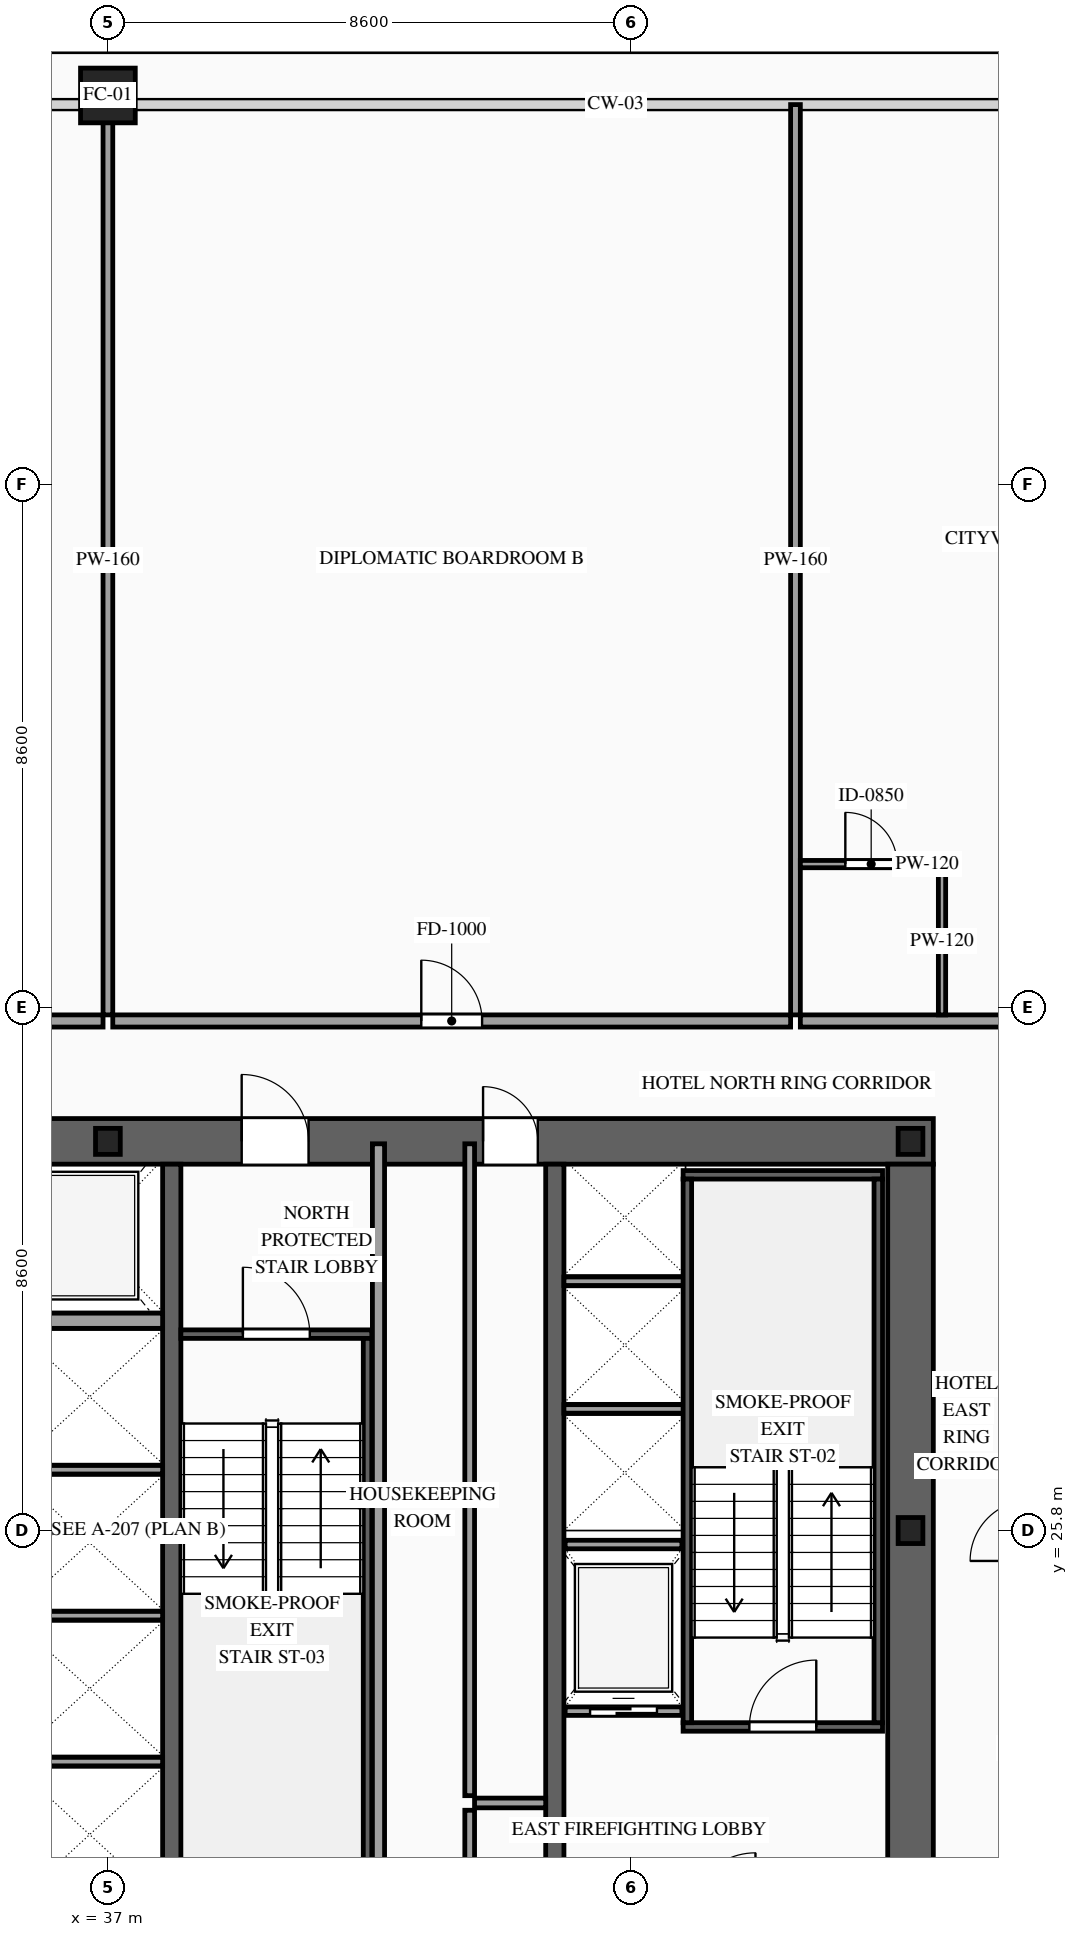
"""IFC4 building model, lengths in metres.
Left out: names, types, materials, properties, quantities, classifications, styles, units other than length and angle.
Written with IfcOpenShell. Run it as: python <this file> out.ifc"""

import sys

from ifc_helpers import new_model, si_unit, direction, frame, frame_2d, origin, origin_2d, place, context, subcontext, project, spatial, rectangle, hollow_rectangle, i_section, extrude, source, transform, mapped, element, fill, save


model = new_model("IFC4")
c1 = context("Model", 3, precision=1e-05, world=origin(), true_north=direction((0.0, 1.0)))
c2 = subcontext(c1, "Body", "Model", "MODEL_VIEW")
j1 = project(units=[si_unit("LENGTHUNIT", "METRE"), si_unit("PLANEANGLEUNIT", "RADIAN")], contexts=[c1])
p1 = place(None, origin())
s1 = spatial("IfcSite", under=j1, at=p1, CompositionType="ELEMENT")
p2 = place(p1, origin())
s2 = spatial("IfcBuilding", under=s1, at=p2, CompositionType="ELEMENT")
p3 = place(p2, frame((0.0, 0.0, 101.0)))
s3 = spatial("IfcBuildingStorey", under=s2, at=p3, CompositionType="ELEMENT", Elevation=101.0)
p4 = place(p3, frame((23.425, 32.2, 0.0), z_axis=(0.0, 0.0, 1.0), x_axis=(1.0, 0.0, 0.0)))
e1 = element("IfcWall", 1, at=p4, inside=s3, PredefinedType="SHEAR", context=c2, shape_type="SweptSolid", body=[
    extrude(rectangle(XDim=27.15, YDim=0.75, at=frame_2d((13.575, 0.0))), origin(), (0.0, 0.0, 1.0), 3.6),
])
p5 = place(p4, frame((4.645, 0.0, 0.0)))
e2 = element("IfcOpeningElement", 2, at=p5, cuts=e1, PredefinedType="OPENING", context=c2, shape_type="SweptSolid", body=[
    extrude(rectangle(XDim=0.9, YDim=2.15, at=frame_2d((0.45, 1.075))), frame((0.0, 0.39, 0.0), z_axis=(0.0, -1.0, 0.0), x_axis=(1.0, 0.0, 0.0)), (0.0, 0.0, 1.0), 0.78),
])
p6 = place(p4, frame((9.925, 0.0, 0.0)))
e3 = element("IfcOpeningElement", 3, at=p6, cuts=e1, PredefinedType="OPENING", context=c2, shape_type="SweptSolid", body=[
    extrude(rectangle(XDim=1.1, YDim=2.2, at=frame_2d((0.55, 1.1))), frame((0.0, 0.39, 0.0), z_axis=(0.0, -1.0, 0.0), x_axis=(1.0, 0.0, 0.0)), (0.0, 0.0, 1.0), 0.78),
])
p7 = place(p4, frame((15.775, 0.0, 0.0)))
e4 = element("IfcOpeningElement", 4, at=p7, cuts=e1, PredefinedType="OPENING", context=c2, shape_type="SweptSolid", body=[
    extrude(rectangle(XDim=1.1, YDim=2.2, at=frame_2d((0.55, 1.1))), frame((0.0, 0.39, 0.0), z_axis=(0.0, -1.0, 0.0), x_axis=(1.0, 0.0, 0.0)), (0.0, 0.0, 1.0), 0.78),
])
p8 = place(p4, frame((19.745, 0.0, 0.0)))
e5 = element("IfcOpeningElement", 5, at=p8, cuts=e1, PredefinedType="OPENING", context=c2, shape_type="SweptSolid", body=[
    extrude(rectangle(XDim=0.9, YDim=2.15, at=frame_2d((0.45, 1.075))), frame((0.0, 0.39, 0.0), z_axis=(0.0, -1.0, 0.0), x_axis=(1.0, 0.0, 0.0)), (0.0, 0.0, 1.0), 0.78),
])
m1 = source(origin(), c2, "Body", "SweptSolid", [
    extrude(rectangle(XDim=12.05, YDim=0.75, at=frame_2d((6.025, 0.0))), origin(), (0.0, 0.0, 1.0), 3.6),
])
p9 = place(p3, frame((50.2, 19.775, 0.0), z_axis=(0.0, 0.0, 1.0), x_axis=(0.0, 1.0, 0.0)))
e6 = element("IfcWall", 6, at=p9, inside=s3, PredefinedType="SHEAR", context=c2, shape_type="MappedRepresentation", body=[
    mapped(m1, transform((0.0, 0.0, 0.0), scale=1.0)),
])
m2 = source(origin(), c2, "Body", "SweptSolid", [
    extrude(rectangle(XDim=12.05, YDim=0.3, at=frame_2d((6.025, 0.0))), origin(), (0.0, 0.0, 1.0), 3.6),
])
for number, where, z_axis, x_axis in (
    (7, (38.05, 19.775, 0.0), (0.0, 0.0, 1.0), (0.0, 1.0, 0.0)),
    (8, (44.35, 19.775, 0.0), (0.0, 0.0, 1.0), (0.0, 1.0, 0.0)),
):
    element("IfcWall", number, at=place(p3, frame(where, z_axis=z_axis, x_axis=x_axis)), inside=s3, PredefinedType="SOLIDWALL", context=c2, shape_type="MappedRepresentation", body=[
        mapped(m2, transform((0.0, 0.0, 0.0), scale=1.0)),
    ])
m3 = source(origin(), c2, "Body", "SweptSolid", [
    extrude(i_section(OverallWidth=0.407, OverallDepth=0.428, WebThickness=0.02, FlangeThickness=0.035, at=origin_2d()), origin(), (0.0, 0.0, 1.0), 3.6),
])
for number, where, z_axis, x_axis in (
    (9, (50.2, 25.8, 0.0), (0.0, 0.0, 1.0), (1.0, 0.0, 0.0)),
    (10, (37.0, 32.2, 0.0), (0.0, 0.0, 1.0), (1.0, 0.0, 0.0)),
    (11, (50.2, 32.2, 0.0), (0.0, 0.0, 1.0), (1.0, 0.0, 0.0)),
):
    element("IfcColumn", number, at=place(p3, frame(where, z_axis=z_axis, x_axis=x_axis)), inside=s3, PredefinedType="COLUMN", context=c2, shape_type="MappedRepresentation", body=[
        mapped(m3, transform((0.0, 0.0, 0.0), scale=1.0)),
    ])
m4 = source(origin(), c2, "Body", "SweptSolid", [
    extrude(hollow_rectangle(XDim=0.9, YDim=0.9, WallThickness=0.042, at=origin_2d()), origin(), (0.0, 0.0, 1.0), 3.6),
])
p10 = place(p3, frame((37.0, 49.4, 0.0), z_axis=(0.0, 0.0, 1.0), x_axis=(1.0, 0.0, 0.0)))
e12 = element("IfcColumn", 12, at=p10, inside=s3, PredefinedType="COLUMN", context=c2, shape_type="MappedRepresentation", body=[
    mapped(m4, transform((0.0, 0.0, 0.0), scale=1.0)),
])
p11 = place(p3, frame((44.52, 22.83, 0.0), z_axis=(0.0, 0.0, 1.0), x_axis=(1.0, 0.0, 0.0)))
e13 = element("IfcWall", 13, at=p11, inside=s3, PredefinedType="SOLIDWALL", context=c2, shape_type="SweptSolid", body=[
    extrude(rectangle(XDim=1.92, YDim=0.14, at=frame_2d((0.96, 0.0))), origin(), (0.0, 0.0, 1.0), 3.38),
])
p12 = place(p11, frame((0.41, 0.0, 0.0)))
e14 = element("IfcOpeningElement", 14, at=p12, cuts=e13, PredefinedType="OPENING", context=c2, shape_type="SweptSolid", body=[
    extrude(rectangle(XDim=1.1, YDim=2.2, at=frame_2d((0.55, 1.1))), frame((0.0, 0.085, 0.0), z_axis=(0.0, -1.0, 0.0), x_axis=(1.0, 0.0, 0.0)), (0.0, 0.0, 1.0), 0.17),
])
m5 = source(origin(), c2, "Body", "SweptSolid", [
    extrude(rectangle(XDim=1.92, YDim=0.14, at=frame_2d((0.96, 0.0))), origin(), (0.0, 0.0, 1.0), 3.38),
])
p13 = place(p3, frame((44.52, 25.57, 0.0), z_axis=(0.0, 0.0, 1.0), x_axis=(1.0, 0.0, 0.0)))
e15 = element("IfcWall", 15, at=p13, inside=s3, PredefinedType="SOLIDWALL", context=c2, shape_type="MappedRepresentation", body=[
    mapped(m5, transform((0.0, 0.0, 0.0), scale=1.0)),
])
m6 = source(origin(), c2, "Body", "SweptSolid", [
    extrude(rectangle(XDim=2.4, YDim=0.14, at=frame_2d((1.2, 0.0))), origin(), (0.0, 0.0, 1.0), 3.38),
])
for number, where, z_axis, x_axis in (
    (16, (35.5, 22.0, 0.0), (0.0, 0.0, 1.0), (1.0, 0.0, 0.0)),
    (17, (35.5, 24.4, 0.0), (0.0, 0.0, 1.0), (1.0, 0.0, 0.0)),
    (18, (35.5, 26.8, 0.0), (0.0, 0.0, 1.0), (1.0, 0.0, 0.0)),
):
    element("IfcWall", number, at=place(p3, frame(where, z_axis=z_axis, x_axis=x_axis)), inside=s3, PredefinedType="SOLIDWALL", context=c2, shape_type="MappedRepresentation", body=[
        mapped(m6, transform((0.0, 0.0, 0.0), scale=1.0)),
    ])
m7 = source(origin(), c2, "Body", "SweptSolid", [
    extrude(rectangle(XDim=2.4, YDim=0.25, at=frame_2d((1.2, 0.0))), origin(), (0.0, 0.0, 1.0), 3.38),
])
p14 = place(p3, frame((35.5, 29.25, 0.0), z_axis=(0.0, 0.0, 1.0), x_axis=(1.0, 0.0, 0.0)))
e19 = element("IfcWall", 19, at=p14, inside=s3, PredefinedType="SOLIDWALL", context=c2, shape_type="MappedRepresentation", body=[
    mapped(m7, transform((0.0, 0.0, 0.0), scale=1.0)),
])
m8 = source(origin(), c2, "Body", "SweptSolid", [
    extrude(rectangle(XDim=2.0, YDim=0.14, at=frame_2d((1.0, 0.0))), origin(), (0.0, 0.0, 1.0), 3.38),
])
for number, where, z_axis, x_axis in (
    (20, (44.5, 27.8, 0.0), (0.0, 0.0, 1.0), (1.0, 0.0, 0.0)),
    (21, (44.5, 29.9, 0.0), (0.0, 0.0, 1.0), (1.0, 0.0, 0.0)),
):
    element("IfcWall", number, at=place(p3, frame(where, z_axis=z_axis, x_axis=x_axis)), inside=s3, PredefinedType="SOLIDWALL", context=c2, shape_type="MappedRepresentation", body=[
        mapped(m8, transform((0.0, 0.0, 0.0), scale=1.0)),
    ])
p15 = place(p3, frame((46.46, 22.57, 0.0), z_axis=(0.0, 0.0, 1.0), x_axis=(1.0, 0.0, 0.0)))
e22 = element("IfcWall", 22, at=p15, inside=s3, PredefinedType="SOLIDWALL", context=c2, shape_type="SweptSolid", body=[
    extrude(rectangle(XDim=3.28, YDim=0.14, at=frame_2d((1.64, 0.0))), origin(), (0.0, 0.0, 1.0), 3.38),
])
p16 = place(p15, frame((1.09, 0.0, 0.0)))
e23 = element("IfcOpeningElement", 23, at=p16, cuts=e22, PredefinedType="OPENING", context=c2, shape_type="SweptSolid", body=[
    extrude(rectangle(XDim=1.1, YDim=2.2, at=frame_2d((0.55, 1.1))), frame((0.0, 0.085, 0.0), z_axis=(0.0, -1.0, 0.0), x_axis=(1.0, 0.0, 0.0)), (0.0, 0.0, 1.0), 0.17),
])
m9 = source(origin(), c2, "Body", "SweptSolid", [
    extrude(rectangle(XDim=3.28, YDim=0.14, at=frame_2d((1.64, 0.0))), origin(), (0.0, 0.0, 1.0), 3.38),
])
p17 = place(p3, frame((46.46, 31.65, 0.0), z_axis=(0.0, 0.0, 1.0), x_axis=(1.0, 0.0, 0.0)))
e24 = element("IfcWall", 24, at=p17, inside=s3, PredefinedType="SOLIDWALL", context=c2, shape_type="MappedRepresentation", body=[
    mapped(m9, transform((0.0, 0.0, 0.0), scale=1.0)),
])
m10 = source(origin(), c2, "Body", "SweptSolid", [
    extrude(rectangle(XDim=8.94, YDim=0.14, at=frame_2d((4.47, 0.0))), origin(), (0.0, 0.0, 1.0), 3.38),
])
for number, where, z_axis, x_axis in (
    (25, (46.53, 22.64, 0.0), (0.0, 0.0, 1.0), (0.0, 1.0, 0.0)),
    (26, (49.67, 22.64, 0.0), (0.0, 0.0, 1.0), (0.0, 1.0, 0.0)),
):
    element("IfcWall", number, at=place(p3, frame(where, z_axis=z_axis, x_axis=x_axis)), inside=s3, PredefinedType="SOLIDWALL", context=c2, shape_type="MappedRepresentation", body=[
        mapped(m10, transform((0.0, 0.0, 0.0), scale=1.0)),
    ])
p18 = place(p3, frame((38.2, 29.03, 0.0), z_axis=(0.0, 0.0, 1.0), x_axis=(1.0, 0.0, 0.0)))
e27 = element("IfcWall", 27, at=p18, inside=s3, PredefinedType="SOLIDWALL", context=c2, shape_type="SweptSolid", body=[
    extrude(rectangle(XDim=3.14, YDim=0.14, at=frame_2d((1.57, 0.0))), origin(), (0.0, 0.0, 1.0), 3.38),
])
p19 = place(p18, frame((1.02, 0.0, 0.0)))
e28 = element("IfcOpeningElement", 28, at=p19, cuts=e27, PredefinedType="OPENING", context=c2, shape_type="SweptSolid", body=[
    extrude(rectangle(XDim=1.1, YDim=2.2, at=frame_2d((0.55, 1.1))), frame((0.0, 0.085, 0.0), z_axis=(0.0, -1.0, 0.0), x_axis=(1.0, 0.0, 0.0)), (0.0, 0.0, 1.0), 0.17),
])
m11 = source(origin(), c2, "Body", "SweptSolid", [
    extrude(rectangle(XDim=8.94, YDim=0.14, at=frame_2d((4.47, 0.0))), origin(), (0.0, 0.0, 1.0), 3.38),
])
p20 = place(p3, frame((41.27, 20.02, 0.0), z_axis=(0.0, 0.0, 1.0), x_axis=(0.0, 1.0, 0.0)))
e29 = element("IfcWall", 29, at=p20, inside=s3, PredefinedType="SOLIDWALL", context=c2, shape_type="MappedRepresentation", body=[
    mapped(m11, transform((0.0, 0.0, 0.0), scale=1.0)),
])
m12 = source(origin(), c2, "Body", "SweptSolid", [
    extrude(rectangle(XDim=1.34, YDim=0.16, at=frame_2d((0.67, 0.0))), origin(), (0.0, 0.0, 1.0), 3.38),
])
p21 = place(p3, frame((42.95, 19.86, 0.0), z_axis=(0.0, 0.0, 1.0), x_axis=(0.0, 1.0, 0.0)))
e30 = element("IfcWall", 30, at=p21, inside=s3, PredefinedType="PARTITIONING", context=c2, shape_type="MappedRepresentation", body=[
    mapped(m12, transform((0.0, 0.0, 0.0), scale=1.0)),
])
m13 = source(origin(), c2, "Body", "SweptSolid", [
    extrude(rectangle(XDim=1.17, YDim=0.16, at=frame_2d((0.585, 0.0))), origin(), (0.0, 0.0, 1.0), 3.38),
])
p22 = place(p3, frame((43.03, 21.32, 0.0), z_axis=(0.0, 0.0, 1.0), x_axis=(1.0, 0.0, 0.0)))
e31 = element("IfcWall", 31, at=p22, inside=s3, PredefinedType="PARTITIONING", context=c2, shape_type="MappedRepresentation", body=[
    mapped(m13, transform((0.0, 0.0, 0.0), scale=1.0)),
])
m14 = source(origin(), c2, "Body", "SweptSolid", [
    extrude(rectangle(XDim=12.72, YDim=0.2, at=frame_2d((6.36, 0.0))), origin(), (0.0, 0.0, 1.0), 3.38),
])
p23 = place(p3, frame((41.45, 19.44, 0.0), z_axis=(0.0, 0.0, 1.0), x_axis=(0.0, 1.0, 0.0)))
e32 = element("IfcWall", 32, at=p23, inside=s3, PredefinedType="PARTITIONING", context=c2, shape_type="MappedRepresentation", body=[
    mapped(m14, transform((0.0, 0.0, 0.0), scale=1.0)),
])
m15 = source(origin(), c2, "Body", "SweptSolid", [
    extrude(rectangle(XDim=10.72, YDim=0.16, at=frame_2d((5.36, 0.0))), origin(), (0.0, 0.0, 1.0), 3.38),
])
p24 = place(p3, frame((42.95, 21.44, 0.0), z_axis=(0.0, 0.0, 1.0), x_axis=(0.0, 1.0, 0.0)))
e33 = element("IfcWall", 33, at=p24, inside=s3, PredefinedType="PARTITIONING", context=c2, shape_type="MappedRepresentation", body=[
    mapped(m15, transform((0.0, 0.0, 0.0), scale=1.0)),
])
p25 = place(p3, frame((27.828, 34.18, 0.0), z_axis=(0.0, 0.0, 1.0), x_axis=(1.0, 0.0, 0.0)))
e34 = element("IfcWall", 34, at=p25, inside=s3, PredefinedType="PARTITIONING", context=c2, shape_type="SweptSolid", body=[
    extrude(rectangle(XDim=9.092, YDim=0.2, at=frame_2d((4.546, 0.0))), origin(), (0.0, 0.0, 1.0), 3.38),
])
p26 = place(p25, frame((4.046, 0.0, 0.0)))
e35 = element("IfcOpeningElement", 35, at=p26, cuts=e34, PredefinedType="OPENING", context=c2, shape_type="SweptSolid", body=[
    extrude(rectangle(XDim=1.0, YDim=2.2, at=frame_2d((0.5, 1.1))), frame((0.0, 0.115, 0.0), z_axis=(0.0, -1.0, 0.0), x_axis=(1.0, 0.0, 0.0)), (0.0, 0.0, 1.0), 0.23),
])
m16 = source(origin(), c2, "Body", "SweptSolid", [
    extrude(rectangle(XDim=14.97, YDim=0.16, at=frame_2d((7.485, 0.0))), origin(), (0.0, 0.0, 1.0), 2.675),
])
p27 = place(p3, frame((37.0, 34.28, 0.0), z_axis=(0.0, 0.0, 1.0), x_axis=(0.0, 1.0, 0.0)))
e36 = element("IfcWall", 36, at=p27, inside=s3, PredefinedType="PARTITIONING", context=c2, shape_type="MappedRepresentation", body=[
    mapped(m16, transform((0.0, 0.0, 0.0), scale=1.0)),
])
p28 = place(p3, frame((37.08, 34.18, 0.0), z_axis=(0.0, 0.0, 1.0), x_axis=(1.0, 0.0, 0.0)))
e37 = element("IfcWall", 37, at=p28, inside=s3, PredefinedType="PARTITIONING", context=c2, shape_type="SweptSolid", body=[
    extrude(rectangle(XDim=11.148, YDim=0.2, at=frame_2d((5.574, 0.0))), origin(), (0.0, 0.0, 1.0), 3.38),
])
p29 = place(p28, frame((5.074, 0.0, 0.0)))
e38 = element("IfcOpeningElement", 38, at=p29, cuts=e37, PredefinedType="OPENING", context=c2, shape_type="SweptSolid", body=[
    extrude(rectangle(XDim=1.0, YDim=2.2, at=frame_2d((0.5, 1.1))), frame((0.0, 0.115, 0.0), z_axis=(0.0, -1.0, 0.0), x_axis=(1.0, 0.0, 0.0)), (0.0, 0.0, 1.0), 0.23),
])
m17 = source(origin(), c2, "Body", "SweptSolid", [
    extrude(rectangle(XDim=14.97, YDim=0.16, at=frame_2d((7.485, 0.0))), origin(), (0.0, 0.0, 1.0), 3.38),
])
p30 = place(p3, frame((48.308, 34.28, 0.0), z_axis=(0.0, 0.0, 1.0), x_axis=(0.0, 1.0, 0.0)))
e39 = element("IfcWall", 39, at=p30, inside=s3, PredefinedType="PARTITIONING", context=c2, shape_type="MappedRepresentation", body=[
    mapped(m17, transform((0.0, 0.0, 0.0), scale=1.0)),
])
p31 = place(p3, frame((48.388, 34.18, 0.0), z_axis=(0.0, 0.0, 1.0), x_axis=(1.0, 0.0, 0.0)))
e40 = element("IfcWall", 40, at=p31, inside=s3, PredefinedType="PARTITIONING", context=c2, shape_type="SweptSolid", body=[
    extrude(rectangle(XDim=9.172, YDim=0.2, at=frame_2d((4.586, 0.0))), origin(), (0.0, 0.0, 1.0), 3.38),
])
p32 = place(p31, frame((5.291, 0.0, 0.0)))
e41 = element("IfcOpeningElement", 41, at=p32, cuts=e40, PredefinedType="OPENING", context=c2, shape_type="SweptSolid", body=[
    extrude(rectangle(XDim=1.0, YDim=2.2, at=frame_2d((0.5, 1.1))), frame((0.0, 0.115, 0.0), z_axis=(0.0, -1.0, 0.0), x_axis=(1.0, 0.0, 0.0)), (0.0, 0.0, 1.0), 0.23),
])
p33 = place(p3, frame((48.388, 36.76, 0.0), z_axis=(0.0, 0.0, 1.0), x_axis=(1.0, 0.0, 0.0)))
e42 = element("IfcWall", 42, at=p33, inside=s3, PredefinedType="PARTITIONING", context=c2, shape_type="SweptSolid", body=[
    extrude(rectangle(XDim=2.33, YDim=0.12, at=frame_2d((1.165, 0.0))), origin(), (0.0, 0.0, 1.0), 3.38),
])
p34 = place(p33, frame((0.74, 0.0, 0.0)))
e43 = element("IfcOpeningElement", 43, at=p34, cuts=e42, PredefinedType="OPENING", context=c2, shape_type="SweptSolid", body=[
    extrude(rectangle(XDim=0.85, YDim=2.1, at=frame_2d((0.425, 1.05))), frame((0.0, 0.075, 0.0), z_axis=(0.0, -1.0, 0.0), x_axis=(1.0, 0.0, 0.0)), (0.0, 0.0, 1.0), 0.15),
])
m18 = source(origin(), c2, "Body", "SweptSolid", [
    extrude(rectangle(XDim=2.42, YDim=0.12, at=frame_2d((1.21, 0.0))), origin(), (0.0, 0.0, 1.0), 3.38),
])
p35 = place(p3, frame((50.718, 34.28, 0.0), z_axis=(0.0, 0.0, 1.0), x_axis=(0.0, 1.0, 0.0)))
e44 = element("IfcWall", 44, at=p35, inside=s3, PredefinedType="PARTITIONING", context=c2, shape_type="MappedRepresentation", body=[
    mapped(m18, transform((0.0, 0.0, 0.0), scale=1.0)),
])
m19 = source(origin(), c2, "Body", "SweptSolid", [
    extrude(rectangle(XDim=1.1, YDim=2.2, at=frame_2d((0.55, 1.1))), frame((0.0, 0.025, 0.0), z_axis=(0.0, -1.0, 0.0), x_axis=(1.0, 0.0, 0.0)), (0.0, 0.0, 1.0), 0.05),
])
p36 = place(p12, origin())
e45 = element("IfcDoor", 45, at=p36, inside=s3, OperationType="SLIDING_TO_RIGHT", PredefinedType="DOOR", context=c2, shape_type="MappedRepresentation", body=[
    mapped(m19, transform((0.0, 0.0, 0.0), scale=1.0)),
])
fill(e14, e45)
m20 = source(origin(), c2, "Body", "SweptSolid", [
    extrude(rectangle(XDim=1.1, YDim=2.2, at=frame_2d((0.55, 1.1))), frame((0.0, 0.025, 0.0), z_axis=(0.0, -1.0, 0.0), x_axis=(1.0, 0.0, 0.0)), (0.0, 0.0, 1.0), 0.05),
])
p37 = place(p16, origin())
e46 = element("IfcDoor", 46, at=p37, inside=s3, OperationType="SINGLE_SWING_RIGHT", PredefinedType="DOOR", context=c2, shape_type="MappedRepresentation", body=[
    mapped(m20, transform((0.0, 0.0, 0.0), scale=1.0)),
])
fill(e23, e46)
p38 = place(p19, origin())
e47 = element("IfcDoor", 47, at=p38, inside=s3, OperationType="SINGLE_SWING_LEFT", PredefinedType="DOOR", context=c2, shape_type="MappedRepresentation", body=[
    mapped(m20, transform((0.0, 0.0, 0.0), scale=1.0)),
])
fill(e28, e47)
p39 = place(p7, origin())
e48 = element("IfcDoor", 48, at=p39, inside=s3, OperationType="SINGLE_SWING_LEFT", PredefinedType="DOOR", context=c2, shape_type="MappedRepresentation", body=[
    mapped(m20, transform((0.0, 0.0, 0.0), scale=1.0)),
])
fill(e4, e48)
m21 = source(origin(), c2, "Body", "SweptSolid", [
    extrude(rectangle(XDim=0.9, YDim=2.15, at=frame_2d((0.45, 1.075))), frame((0.0, 0.025, 0.0), z_axis=(0.0, -1.0, 0.0), x_axis=(1.0, 0.0, 0.0)), (0.0, 0.0, 1.0), 0.05),
])
p40 = place(p8, origin())
e49 = element("IfcDoor", 49, at=p40, inside=s3, OperationType="SINGLE_SWING_LEFT", PredefinedType="DOOR", context=c2, shape_type="MappedRepresentation", body=[
    mapped(m21, transform((0.0, 0.0, 0.0), scale=1.0)),
])
fill(e5, e49)
m22 = source(origin(), c2, "Body", "SweptSolid", [
    extrude(rectangle(XDim=1.0, YDim=2.2, at=frame_2d((0.5, 1.1))), frame((0.0, 0.025, 0.0), z_axis=(0.0, -1.0, 0.0), x_axis=(1.0, 0.0, 0.0)), (0.0, 0.0, 1.0), 0.05),
])
p41 = place(p29, origin())
e50 = element("IfcDoor", 50, at=p41, inside=s3, OperationType="SINGLE_SWING_LEFT", PredefinedType="DOOR", context=c2, shape_type="MappedRepresentation", body=[
    mapped(m22, transform((0.0, 0.0, 0.0), scale=1.0)),
])
fill(e38, e50)
m23 = source(origin(), c2, "Body", "SweptSolid", [
    extrude(rectangle(XDim=0.85, YDim=2.1, at=frame_2d((0.425, 1.05))), frame((0.0, 0.025, 0.0), z_axis=(0.0, -1.0, 0.0), x_axis=(1.0, 0.0, 0.0)), (0.0, 0.0, 1.0), 0.05),
])
p42 = place(p34, origin())
e51 = element("IfcDoor", 51, at=p42, inside=s3, OperationType="SINGLE_SWING_LEFT", PredefinedType="DOOR", context=c2, shape_type="MappedRepresentation", body=[
    mapped(m23, transform((0.0, 0.0, 0.0), scale=1.0)),
])
fill(e43, e51)
save(model, sys.argv[1])
